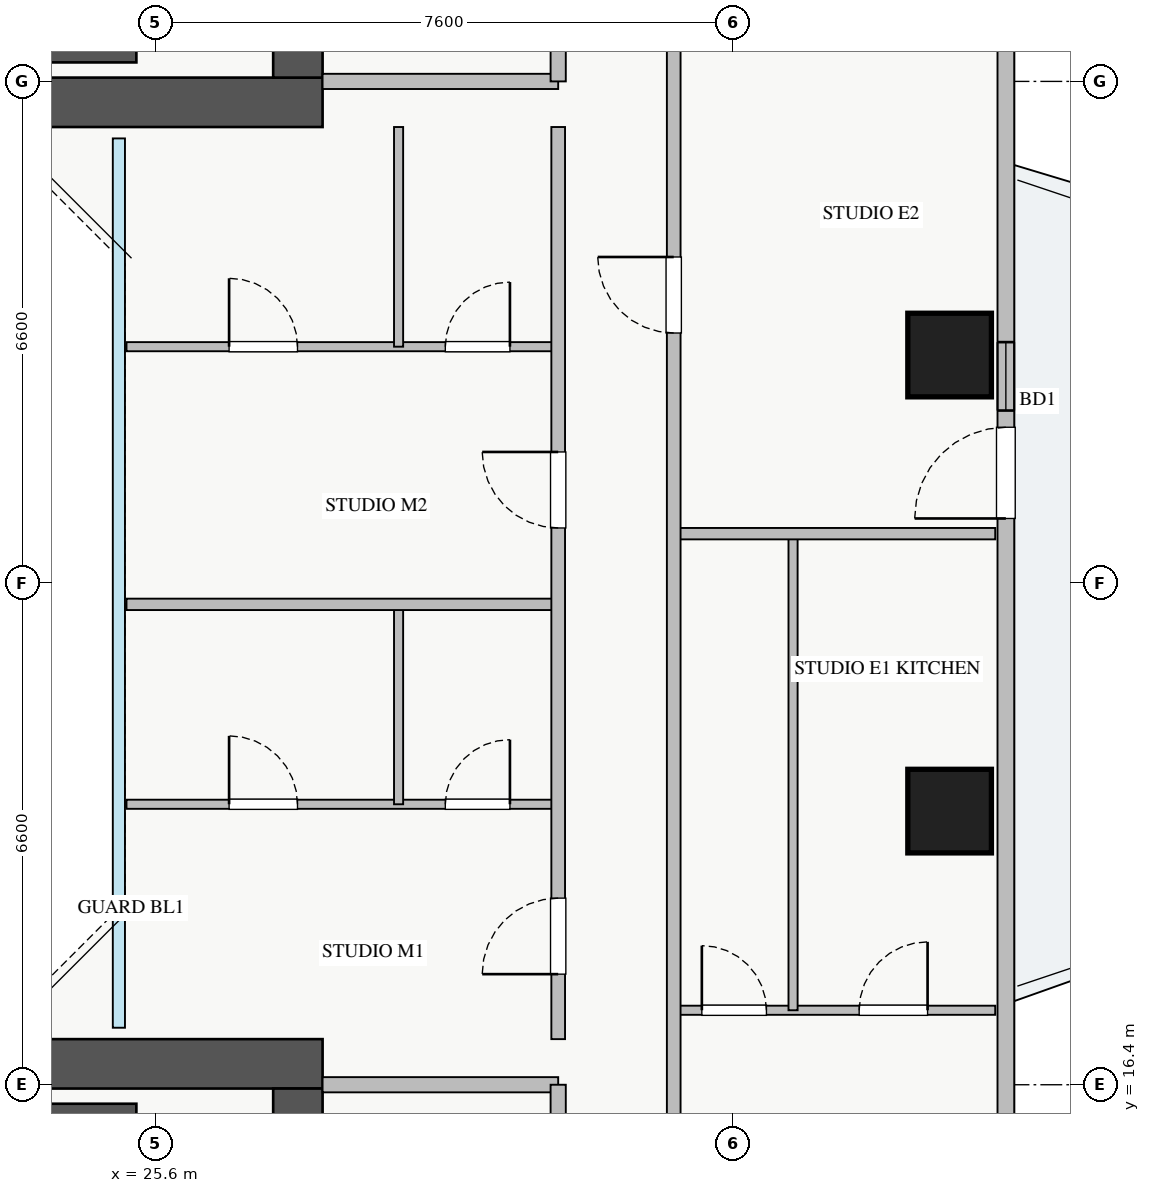
"""IFC4 building model, lengths in metres.
Left out: names, types, materials, properties, quantities, classifications, styles, units other than length and angle.
Written with IfcOpenShell. Run it as: python <this file> out.ifc"""

import sys

from ifc_helpers import new_model, si_unit, direction, frame, frame_2d, origin, origin_2d, place, context, subcontext, project, spatial, rectangle, extrude, source, transform, mapped, element, fill, save


model = new_model("IFC4")
c1 = context("Model", 3, precision=1e-05, world=origin(), true_north=direction((0.0, 1.0)))
c2 = subcontext(c1, "Body", "Model", "MODEL_VIEW")
j1 = project(units=[si_unit("LENGTHUNIT", "METRE"), si_unit("PLANEANGLEUNIT", "RADIAN")], contexts=[c1])
p1 = place(None, origin())
s1 = spatial("IfcSite", under=j1, at=p1, CompositionType="ELEMENT")
p2 = place(p1, origin())
s2 = spatial("IfcBuilding", under=s1, at=p2, CompositionType="ELEMENT")
p3 = place(p2, frame((0.0, 0.0, 116.5)))
s3 = spatial("IfcBuildingStorey", under=s2, at=p3, CompositionType="ELEMENT", Elevation=116.5)
for number, where, z_axis, x_axis in (
    (1, (18.2, 29.95, 0.0), (0.0, 0.0, 1.0), (1.0, 0.0, 0.0)),
    (2, (18.2, 16.05, 0.0), (0.0, 0.0, 1.0), (1.0, 0.0, 0.0)),
):
    element("IfcWall", number, at=place(p3, frame(where, z_axis=z_axis, x_axis=x_axis)), inside=s3, PredefinedType="SHEAR", context=c2, shape_type="SweptSolid", body=[
        extrude(rectangle(XDim=7.15, YDim=0.2, at=frame_2d((3.575, 0.0))), origin(), (0.0, 0.0, 1.0), 3.25),
    ])
p4 = place(p3, frame((10.2, 29.325, 0.0), z_axis=(0.0, 0.0, 1.0), x_axis=(1.0, 0.0, 0.0)))
e3 = element("IfcWall", 3, at=p4, inside=s3, PredefinedType="SHEAR", context=c2, shape_type="SweptSolid", body=[
    extrude(rectangle(XDim=17.6, YDim=0.65, at=frame_2d((8.8, 0.0))), origin(), (0.0, 0.0, 1.0), 3.25),
])
p5 = place(p3, frame((27.475, 29.65, 0.0), z_axis=(0.0, 0.0, 1.0), x_axis=(0.0, 1.0, 0.0)))
e4 = element("IfcWall", 4, at=p5, inside=s3, PredefinedType="SHEAR", context=c2, shape_type="SweptSolid", body=[
    extrude(rectangle(XDim=5.9, YDim=0.65, at=frame_2d((2.95, 0.0))), origin(), (0.0, 0.0, 1.0), 3.25),
])
p6 = place(p5, frame((1.1, 0.0, 0.0)))
e5 = element("IfcOpeningElement", 5, at=p6, cuts=e4, PredefinedType="OPENING", context=c2, shape_type="SweptSolid", body=[
    extrude(rectangle(XDim=1.3, YDim=2.05, at=frame_2d((0.65, 1.025))), frame((0.0, 0.335, 0.0), z_axis=(0.0, -1.0, 0.0), x_axis=(1.0, 0.0, 0.0)), (0.0, 0.0, 1.0), 0.67),
])
p7 = place(p3, frame((10.2, 16.675, 0.0), z_axis=(0.0, 0.0, 1.0), x_axis=(1.0, 0.0, 0.0)))
e6 = element("IfcWall", 6, at=p7, inside=s3, PredefinedType="SHEAR", context=c2, shape_type="SweptSolid", body=[
    extrude(rectangle(XDim=17.6, YDim=0.65, at=frame_2d((8.8, 0.0))), origin(), (0.0, 0.0, 1.0), 3.25),
])
p8 = place(p3, frame((27.475, 10.45, 0.0), z_axis=(0.0, 0.0, 1.0), x_axis=(0.0, 1.0, 0.0)))
e7 = element("IfcWall", 7, at=p8, inside=s3, PredefinedType="SHEAR", context=c2, shape_type="SweptSolid", body=[
    extrude(rectangle(XDim=5.9, YDim=0.65, at=frame_2d((2.95, 0.0))), origin(), (0.0, 0.0, 1.0), 3.25),
])
p9 = place(p8, frame((2.1, 0.0, 0.0)))
e8 = element("IfcOpeningElement", 8, at=p9, cuts=e7, PredefinedType="OPENING", context=c2, shape_type="SweptSolid", body=[
    extrude(rectangle(XDim=1.3, YDim=2.05, at=frame_2d((0.65, 1.025))), frame((0.0, 0.335, 0.0), z_axis=(0.0, -1.0, 0.0), x_axis=(1.0, 0.0, 0.0)), (0.0, 0.0, 1.0), 0.67),
])
m1 = source(origin(), c2, "Body", "SweptSolid", [
    extrude(rectangle(XDim=1.1, YDim=1.1, at=origin_2d()), origin(), (0.0, 0.0, 1.0), 3.25),
])
for number, where, z_axis, x_axis in (
    (9, (36.05, 20.0, 0.0), (0.0, 0.0, 1.0), (1.0, 0.0, 0.0)),
    (10, (36.05, 26.0, 0.0), (0.0, 0.0, 1.0), (1.0, 0.0, 0.0)),
):
    element("IfcColumn", number, at=place(p3, frame(where, z_axis=z_axis, x_axis=x_axis)), inside=s3, PredefinedType="COLUMN", context=c2, shape_type="MappedRepresentation", body=[
        mapped(m1, transform((0.0, 0.0, 0.0), x_axis=(1.0, 0.0, 0.0), y_axis=(0.0, 1.0, 0.0), z_axis=(0.0, 0.0, 1.0), scale=1.0)),
    ])
p10 = place(p3, frame((36.79, 10.55, 0.0), z_axis=(0.0, 0.0, 1.0), x_axis=(0.0, 1.0, 0.0)))
e11 = element("IfcWall", 11, at=p10, inside=s3, PredefinedType="STANDARD", context=c2, shape_type="SweptSolid", body=[
    extrude(rectangle(XDim=24.9, YDim=0.22, at=frame_2d((12.45, 0.0))), origin(), (0.0, 0.0, 1.0), 2.61),
])
p11 = place(p10, frame((13.3, 0.0, 0.0)))
e12 = element("IfcOpeningElement", 12, at=p11, cuts=e11, PredefinedType="OPENING", context=c2, shape_type="SweptSolid", body=[
    extrude(rectangle(XDim=1.2, YDim=2.1, at=frame_2d((0.6, 1.05))), frame((0.0, 0.12, 0.0), z_axis=(0.0, -1.0, 0.0), x_axis=(1.0, 0.0, 0.0)), (0.0, 0.0, 1.0), 0.24),
])
p12 = place(p10, frame((1.912, 0.0, 0.9)))
e13 = element("IfcOpeningElement", 13, at=p12, cuts=e11, PredefinedType="OPENING", context=c2, shape_type="SweptSolid", body=[
    extrude(rectangle(XDim=2.4, YDim=1.48, at=frame_2d((1.2, 0.74))), frame((0.0, 0.12, 0.0), z_axis=(0.0, -1.0, 0.0), x_axis=(1.0, 0.0, 0.0)), (0.0, 0.0, 1.0), 0.24),
])
p13 = place(p10, frame((20.737, 0.0, 0.9)))
e14 = element("IfcOpeningElement", 14, at=p13, cuts=e11, PredefinedType="OPENING", context=c2, shape_type="SweptSolid", body=[
    extrude(rectangle(XDim=2.1, YDim=1.48, at=frame_2d((1.05, 0.74))), frame((0.0, 0.12, 0.0), z_axis=(0.0, -1.0, 0.0), x_axis=(1.0, 0.0, 0.0)), (0.0, 0.0, 1.0), 0.24),
])
p14 = place(p10, frame((14.72, 0.0, 0.9)))
e15 = element("IfcOpeningElement", 15, at=p14, cuts=e11, PredefinedType="OPENING", context=c2, shape_type="SweptSolid", body=[
    extrude(rectangle(XDim=0.9, YDim=1.2, at=frame_2d((0.45, 0.6))), frame((0.0, 0.12, 0.0), z_axis=(0.0, -1.0, 0.0), x_axis=(1.0, 0.0, 0.0)), (0.0, 0.0, 1.0), 0.24),
])
p15 = place(p3, frame((27.8, 29.6, 0.0), z_axis=(0.0, 0.0, 1.0), x_axis=(1.0, 0.0, 0.0)))
e16 = element("IfcWall", 16, at=p15, inside=s3, PredefinedType="PARTITIONING", context=c2, shape_type="SweptSolid", body=[
    extrude(rectangle(XDim=3.1, YDim=0.2, at=frame_2d((1.55, 0.0))), origin(), (0.0, 0.0, 1.0), 3.07),
])
p16 = place(p3, frame((30.9, 29.6, 0.0), z_axis=(0.0, 0.0, 1.0), x_axis=(0.0, 1.0, 0.0)))
e17 = element("IfcWall", 17, at=p16, inside=s3, PredefinedType="PARTITIONING", context=c2, shape_type="SweptSolid", body=[
    extrude(rectangle(XDim=3.9, YDim=0.2, at=frame_2d((1.95, 0.0))), origin(), (0.0, 0.0, 1.0), 3.07),
])
p17 = place(p16, frame((1.4, 0.0, 0.0)))
e18 = element("IfcOpeningElement", 18, at=p17, cuts=e17, PredefinedType="OPENING", context=c2, shape_type="SweptSolid", body=[
    extrude(rectangle(XDim=1.1, YDim=2.05, at=frame_2d((0.55, 1.025))), frame((0.0, 0.11, 0.0), z_axis=(0.0, -1.0, 0.0), x_axis=(1.0, 0.0, 0.0)), (0.0, 0.0, 1.0), 0.22),
])
p18 = place(p3, frame((27.8, 16.4, 0.0), z_axis=(0.0, 0.0, 1.0), x_axis=(1.0, 0.0, 0.0)))
e19 = element("IfcWall", 19, at=p18, inside=s3, PredefinedType="PARTITIONING", context=c2, shape_type="SweptSolid", body=[
    extrude(rectangle(XDim=3.1, YDim=0.2, at=frame_2d((1.55, 0.0))), origin(), (0.0, 0.0, 1.0), 3.07),
])
p19 = place(p3, frame((30.9, 12.5, 0.0), z_axis=(0.0, 0.0, 1.0), x_axis=(0.0, 1.0, 0.0)))
e20 = element("IfcWall", 20, at=p19, inside=s3, PredefinedType="PARTITIONING", context=c2, shape_type="SweptSolid", body=[
    extrude(rectangle(XDim=3.9, YDim=0.2, at=frame_2d((1.95, 0.0))), origin(), (0.0, 0.0, 1.0), 3.07),
])
p20 = place(p19, frame((1.4, 0.0, 0.0)))
e21 = element("IfcOpeningElement", 21, at=p20, cuts=e20, PredefinedType="OPENING", context=c2, shape_type="SweptSolid", body=[
    extrude(rectangle(XDim=1.1, YDim=2.05, at=frame_2d((0.55, 1.025))), frame((0.0, 0.11, 0.0), z_axis=(0.0, -1.0, 0.0), x_axis=(1.0, 0.0, 0.0)), (0.0, 0.0, 1.0), 0.22),
])
p21 = place(p3, frame((32.42, 17.38, 0.0), z_axis=(0.0, 0.0, 1.0), x_axis=(1.0, 0.0, 0.0)))
e22 = element("IfcWall", 22, at=p21, inside=s3, PredefinedType="PLUMBINGWALL", context=c2, shape_type="SweptSolid", body=[
    extrude(rectangle(XDim=4.23, YDim=0.12, at=frame_2d((2.115, 0.0))), origin(), (0.0, 0.0, 1.0), 3.07),
])
p22 = place(p21, frame((0.37, 0.0, 0.0)))
e23 = element("IfcOpeningElement", 23, at=p22, cuts=e22, PredefinedType="OPENING", context=c2, shape_type="SweptSolid", body=[
    extrude(rectangle(XDim=0.85, YDim=2.05, at=frame_2d((0.425, 1.025))), frame((0.0, 0.07, 0.0), z_axis=(0.0, -1.0, 0.0), x_axis=(1.0, 0.0, 0.0)), (0.0, 0.0, 1.0), 0.14),
])
p23 = place(p21, frame((2.44, 0.0, 0.0)))
e24 = element("IfcOpeningElement", 24, at=p23, cuts=e22, PredefinedType="OPENING", context=c2, shape_type="SweptSolid", body=[
    extrude(rectangle(XDim=0.9, YDim=2.05, at=frame_2d((0.45, 1.025))), frame((0.0, 0.07, 0.0), z_axis=(0.0, -1.0, 0.0), x_axis=(1.0, 0.0, 0.0)), (0.0, 0.0, 1.0), 0.14),
])
p24 = place(p3, frame((33.99, 17.38, 0.0), z_axis=(0.0, 0.0, 1.0), x_axis=(0.0, 1.0, 0.0)))
e25 = element("IfcWall", 25, at=p24, inside=s3, PredefinedType="PLUMBINGWALL", context=c2, shape_type="SweptSolid", body=[
    extrude(rectangle(XDim=6.27, YDim=0.12, at=frame_2d((3.135, 0.0))), origin(), (0.0, 0.0, 1.0), 3.07),
])
p25 = place(p3, frame((32.42, 23.65, 0.0), z_axis=(0.0, 0.0, 1.0), x_axis=(1.0, 0.0, 0.0)))
e26 = element("IfcWall", 26, at=p25, inside=s3, PredefinedType="PARTITIONING", context=c2, shape_type="SweptSolid", body=[
    extrude(rectangle(XDim=4.23, YDim=0.15, at=frame_2d((2.115, 0.0))), origin(), (0.0, 0.0, 1.0), 3.07),
])
p26 = place(p3, frame((32.42, 8.25, 0.0), z_axis=(0.0, 0.0, 1.0), x_axis=(0.0, 1.0, 0.0)))
e27 = element("IfcWall", 27, at=p26, inside=s3, PredefinedType="PARTITIONING", context=c2, shape_type="SweptSolid", body=[
    extrude(rectangle(XDim=29.5, YDim=0.18, at=frame_2d((14.75, 0.0))), origin(), (0.0, 0.0, 1.0), 3.07),
])
p27 = place(p26, frame((28.155, 0.0, 0.0)))
e28 = element("IfcOpeningElement", 28, at=p27, cuts=e27, PredefinedType="OPENING", context=c2, shape_type="SweptSolid", body=[
    extrude(rectangle(XDim=0.9, YDim=2.05, at=frame_2d((0.45, 1.025))), frame((0.0, 0.1, 0.0), z_axis=(0.0, -1.0, 0.0), x_axis=(1.0, 0.0, 0.0)), (0.0, 0.0, 1.0), 0.2),
])
p28 = place(p26, frame((0.445, 0.0, 0.0)))
e29 = element("IfcOpeningElement", 29, at=p28, cuts=e27, PredefinedType="OPENING", context=c2, shape_type="SweptSolid", body=[
    extrude(rectangle(XDim=0.9, YDim=2.05, at=frame_2d((0.45, 1.025))), frame((0.0, 0.1, 0.0), z_axis=(0.0, -1.0, 0.0), x_axis=(1.0, 0.0, 0.0)), (0.0, 0.0, 1.0), 0.2),
])
p29 = place(p26, frame((4.76, 0.0, 0.0)))
e30 = element("IfcOpeningElement", 30, at=p29, cuts=e27, PredefinedType="OPENING", context=c2, shape_type="SweptSolid", body=[
    extrude(rectangle(XDim=1.0, YDim=2.05, at=frame_2d((0.5, 1.025))), frame((0.0, 0.1, 0.0), z_axis=(0.0, -1.0, 0.0), x_axis=(1.0, 0.0, 0.0)), (0.0, 0.0, 1.0), 0.2),
])
p30 = place(p26, frame((18.04, 0.0, 0.0)))
e31 = element("IfcOpeningElement", 31, at=p30, cuts=e27, PredefinedType="OPENING", context=c2, shape_type="SweptSolid", body=[
    extrude(rectangle(XDim=1.0, YDim=2.05, at=frame_2d((0.5, 1.025))), frame((0.0, 0.1, 0.0), z_axis=(0.0, -1.0, 0.0), x_axis=(1.0, 0.0, 0.0)), (0.0, 0.0, 1.0), 0.2),
])
p31 = place(p3, frame((25.22, 20.09, 0.0), z_axis=(0.0, 0.0, 1.0), x_axis=(1.0, 0.0, 0.0)))
e32 = element("IfcWall", 32, at=p31, inside=s3, PredefinedType="PLUMBINGWALL", context=c2, shape_type="SweptSolid", body=[
    extrude(rectangle(XDim=5.68, YDim=0.12, at=frame_2d((2.84, 0.0))), origin(), (0.0, 0.0, 1.0), 2.625),
])
p32 = place(p31, frame((1.35, 0.0, 0.0)))
e33 = element("IfcOpeningElement", 33, at=p32, cuts=e32, PredefinedType="OPENING", context=c2, shape_type="SweptSolid", body=[
    extrude(rectangle(XDim=0.9, YDim=2.05, at=frame_2d((0.45, 1.025))), frame((0.0, 0.07, 0.0), z_axis=(0.0, -1.0, 0.0), x_axis=(1.0, 0.0, 0.0)), (0.0, 0.0, 1.0), 0.14),
])
p33 = place(p31, frame((4.195, 0.0, 0.0)))
e34 = element("IfcOpeningElement", 34, at=p33, cuts=e32, PredefinedType="OPENING", context=c2, shape_type="SweptSolid", body=[
    extrude(rectangle(XDim=0.85, YDim=2.05, at=frame_2d((0.425, 1.025))), frame((0.0, 0.07, 0.0), z_axis=(0.0, -1.0, 0.0), x_axis=(1.0, 0.0, 0.0)), (0.0, 0.0, 1.0), 0.14),
])
p34 = place(p3, frame((28.8, 20.09, 0.0), z_axis=(0.0, 0.0, 1.0), x_axis=(0.0, 1.0, 0.0)))
e35 = element("IfcWall", 35, at=p34, inside=s3, PredefinedType="PLUMBINGWALL", context=c2, shape_type="SweptSolid", body=[
    extrude(rectangle(XDim=2.63, YDim=0.12, at=frame_2d((1.315, 0.0))), origin(), (0.0, 0.0, 1.0), 3.07),
])
p35 = place(p3, frame((25.22, 26.11, 0.0), z_axis=(0.0, 0.0, 1.0), x_axis=(1.0, 0.0, 0.0)))
e36 = element("IfcWall", 36, at=p35, inside=s3, PredefinedType="PLUMBINGWALL", context=c2, shape_type="SweptSolid", body=[
    extrude(rectangle(XDim=5.68, YDim=0.12, at=frame_2d((2.84, 0.0))), origin(), (0.0, 0.0, 1.0), 2.625),
])
p36 = place(p35, frame((1.35, 0.0, 0.0)))
e37 = element("IfcOpeningElement", 37, at=p36, cuts=e36, PredefinedType="OPENING", context=c2, shape_type="SweptSolid", body=[
    extrude(rectangle(XDim=0.9, YDim=2.05, at=frame_2d((0.45, 1.025))), frame((0.0, 0.07, 0.0), z_axis=(0.0, -1.0, 0.0), x_axis=(1.0, 0.0, 0.0)), (0.0, 0.0, 1.0), 0.14),
])
p37 = place(p35, frame((4.195, 0.0, 0.0)))
e38 = element("IfcOpeningElement", 38, at=p37, cuts=e36, PredefinedType="OPENING", context=c2, shape_type="SweptSolid", body=[
    extrude(rectangle(XDim=0.85, YDim=2.05, at=frame_2d((0.425, 1.025))), frame((0.0, 0.07, 0.0), z_axis=(0.0, -1.0, 0.0), x_axis=(1.0, 0.0, 0.0)), (0.0, 0.0, 1.0), 0.14),
])
p38 = place(p3, frame((28.8, 26.11, 0.0), z_axis=(0.0, 0.0, 1.0), x_axis=(0.0, 1.0, 0.0)))
e39 = element("IfcWall", 39, at=p38, inside=s3, PredefinedType="PLUMBINGWALL", context=c2, shape_type="SweptSolid", body=[
    extrude(rectangle(XDim=2.89, YDim=0.12, at=frame_2d((1.445, 0.0))), origin(), (0.0, 0.0, 1.0), 3.07),
])
p39 = place(p3, frame((25.22, 22.72, 0.0), z_axis=(0.0, 0.0, 1.0), x_axis=(1.0, 0.0, 0.0)))
e40 = element("IfcWall", 40, at=p39, inside=s3, PredefinedType="PARTITIONING", context=c2, shape_type="SweptSolid", body=[
    extrude(rectangle(XDim=5.68, YDim=0.15, at=frame_2d((2.84, 0.0))), origin(), (0.0, 0.0, 1.0), 3.07),
])
p40 = place(p3, frame((30.9, 17.0, 0.0), z_axis=(0.0, 0.0, 1.0), x_axis=(0.0, 1.0, 0.0)))
e41 = element("IfcWall", 41, at=p40, inside=s3, PredefinedType="PARTITIONING", context=c2, shape_type="SweptSolid", body=[
    extrude(rectangle(XDim=12.0, YDim=0.18, at=frame_2d((6.0, 0.0))), origin(), (0.0, 0.0, 1.0), 3.07),
])
p41 = place(p40, frame((0.855, 0.0, 0.0)))
e42 = element("IfcOpeningElement", 42, at=p41, cuts=e41, PredefinedType="OPENING", context=c2, shape_type="SweptSolid", body=[
    extrude(rectangle(XDim=1.0, YDim=2.05, at=frame_2d((0.5, 1.025))), frame((0.0, 0.1, 0.0), z_axis=(0.0, -1.0, 0.0), x_axis=(1.0, 0.0, 0.0)), (0.0, 0.0, 1.0), 0.2),
])
p42 = place(p40, frame((6.725, 0.0, 0.0)))
e43 = element("IfcOpeningElement", 43, at=p42, cuts=e41, PredefinedType="OPENING", context=c2, shape_type="SweptSolid", body=[
    extrude(rectangle(XDim=1.0, YDim=2.05, at=frame_2d((0.5, 1.025))), frame((0.0, 0.1, 0.0), z_axis=(0.0, -1.0, 0.0), x_axis=(1.0, 0.0, 0.0)), (0.0, 0.0, 1.0), 0.2),
])
m2 = source(origin(), c2, "Body", "SweptSolid", [
    extrude(rectangle(XDim=1.2, YDim=2.1, at=frame_2d((0.6, 1.05))), frame((0.0, 0.025, 0.0), z_axis=(0.0, -1.0, 0.0), x_axis=(1.0, 0.0, 0.0)), (0.0, 0.0, 1.0), 0.05),
])
p43 = place(p11, origin())
e44 = element("IfcDoor", 44, at=p43, inside=s3, OperationType="SINGLE_SWING_LEFT", PredefinedType="DOOR", context=c2, shape_type="MappedRepresentation", body=[
    mapped(m2, transform((0.0, 0.0, 0.0), x_axis=(1.0, 0.0, 0.0), y_axis=(0.0, 1.0, 0.0), z_axis=(0.0, 0.0, 1.0), scale=1.0)),
])
fill(e12, e44)
m3 = source(origin(), c2, "Body", "SweptSolid", [
    extrude(rectangle(XDim=0.85, YDim=2.05, at=frame_2d((0.425, 1.025))), frame((0.0, 0.025, 0.0), z_axis=(0.0, -1.0, 0.0), x_axis=(1.0, 0.0, 0.0)), (0.0, 0.0, 1.0), 0.05),
])
p44 = place(p22, origin())
e45 = element("IfcDoor", 45, at=p44, inside=s3, OperationType="SINGLE_SWING_LEFT", PredefinedType="DOOR", context=c2, shape_type="MappedRepresentation", body=[
    mapped(m3, transform((0.0, 0.0, 0.0), x_axis=(1.0, 0.0, 0.0), y_axis=(0.0, 1.0, 0.0), z_axis=(0.0, 0.0, 1.0), scale=1.0)),
])
fill(e23, e45)
m4 = source(origin(), c2, "Body", "SweptSolid", [
    extrude(rectangle(XDim=0.9, YDim=2.05, at=frame_2d((0.45, 1.025))), frame((0.0, 0.025, 0.0), z_axis=(0.0, -1.0, 0.0), x_axis=(1.0, 0.0, 0.0)), (0.0, 0.0, 1.0), 0.05),
])
p45 = place(p23, origin())
e46 = element("IfcDoor", 46, at=p45, inside=s3, OperationType="SINGLE_SWING_RIGHT", PredefinedType="DOOR", context=c2, shape_type="MappedRepresentation", body=[
    mapped(m4, transform((0.0, 0.0, 0.0), x_axis=(1.0, 0.0, 0.0), y_axis=(0.0, 1.0, 0.0), z_axis=(0.0, 0.0, 1.0), scale=1.0)),
])
fill(e24, e46)
m5 = source(origin(), c2, "Body", "SweptSolid", [
    extrude(rectangle(XDim=1.0, YDim=2.05, at=frame_2d((0.5, 1.025))), frame((0.0, 0.025, 0.0), z_axis=(0.0, -1.0, 0.0), x_axis=(1.0, 0.0, 0.0)), (0.0, 0.0, 1.0), 0.05),
])
p46 = place(p30, origin())
e47 = element("IfcDoor", 47, at=p46, inside=s3, OperationType="SINGLE_SWING_RIGHT", PredefinedType="DOOR", context=c2, shape_type="MappedRepresentation", body=[
    mapped(m5, transform((0.0, 0.0, 0.0), x_axis=(1.0, 0.0, 0.0), y_axis=(0.0, 1.0, 0.0), z_axis=(0.0, 0.0, 1.0), scale=1.0)),
])
fill(e31, e47)
p47 = place(p32, origin())
e48 = element("IfcDoor", 48, at=p47, inside=s3, OperationType="SINGLE_SWING_LEFT", PredefinedType="DOOR", context=c2, shape_type="MappedRepresentation", body=[
    mapped(m4, transform((0.0, 0.0, 0.0), x_axis=(1.0, 0.0, 0.0), y_axis=(0.0, 1.0, 0.0), z_axis=(0.0, 0.0, 1.0), scale=1.0)),
])
fill(e33, e48)
p48 = place(p33, origin())
e49 = element("IfcDoor", 49, at=p48, inside=s3, OperationType="SINGLE_SWING_RIGHT", PredefinedType="DOOR", context=c2, shape_type="MappedRepresentation", body=[
    mapped(m3, transform((0.0, 0.0, 0.0), x_axis=(1.0, 0.0, 0.0), y_axis=(0.0, 1.0, 0.0), z_axis=(0.0, 0.0, 1.0), scale=1.0)),
])
fill(e34, e49)
p49 = place(p36, origin())
e50 = element("IfcDoor", 50, at=p49, inside=s3, OperationType="SINGLE_SWING_LEFT", PredefinedType="DOOR", context=c2, shape_type="MappedRepresentation", body=[
    mapped(m4, transform((0.0, 0.0, 0.0), x_axis=(1.0, 0.0, 0.0), y_axis=(0.0, 1.0, 0.0), z_axis=(0.0, 0.0, 1.0), scale=1.0)),
])
fill(e37, e50)
p50 = place(p37, origin())
e51 = element("IfcDoor", 51, at=p50, inside=s3, OperationType="SINGLE_SWING_RIGHT", PredefinedType="DOOR", context=c2, shape_type="MappedRepresentation", body=[
    mapped(m3, transform((0.0, 0.0, 0.0), x_axis=(1.0, 0.0, 0.0), y_axis=(0.0, 1.0, 0.0), z_axis=(0.0, 0.0, 1.0), scale=1.0)),
])
fill(e38, e51)
p51 = place(p41, origin())
e52 = element("IfcDoor", 52, at=p51, inside=s3, OperationType="SINGLE_SWING_LEFT", PredefinedType="DOOR", context=c2, shape_type="MappedRepresentation", body=[
    mapped(m5, transform((0.0, 0.0, 0.0), x_axis=(1.0, 0.0, 0.0), y_axis=(0.0, 1.0, 0.0), z_axis=(0.0, 0.0, 1.0), scale=1.0)),
])
fill(e42, e52)
p52 = place(p42, origin())
e53 = element("IfcDoor", 53, at=p52, inside=s3, OperationType="SINGLE_SWING_RIGHT", PredefinedType="DOOR", context=c2, shape_type="MappedRepresentation", body=[
    mapped(m5, transform((0.0, 0.0, 0.0), x_axis=(1.0, 0.0, 0.0), y_axis=(0.0, 1.0, 0.0), z_axis=(0.0, 0.0, 1.0), scale=1.0)),
])
fill(e43, e53)
m6 = source(origin(), c2, "Body", "SweptSolid", [
    extrude(rectangle(XDim=0.9, YDim=1.2, at=frame_2d((0.45, 0.6))), frame((0.0, 0.03, 0.0), z_axis=(0.0, -1.0, 0.0), x_axis=(1.0, 0.0, 0.0)), (0.0, 0.0, 1.0), 0.06),
])
p53 = place(p14, origin())
e54 = element("IfcWindow", 54, at=p53, inside=s3, PartitioningType="SINGLE_PANEL", PredefinedType="WINDOW", context=c2, shape_type="MappedRepresentation", body=[
    mapped(m6, transform((0.0, 0.0, 0.0), x_axis=(1.0, 0.0, 0.0), y_axis=(0.0, 1.0, 0.0), z_axis=(0.0, 0.0, 1.0), scale=1.0)),
])
fill(e15, e54)
save(model, sys.argv[1])
